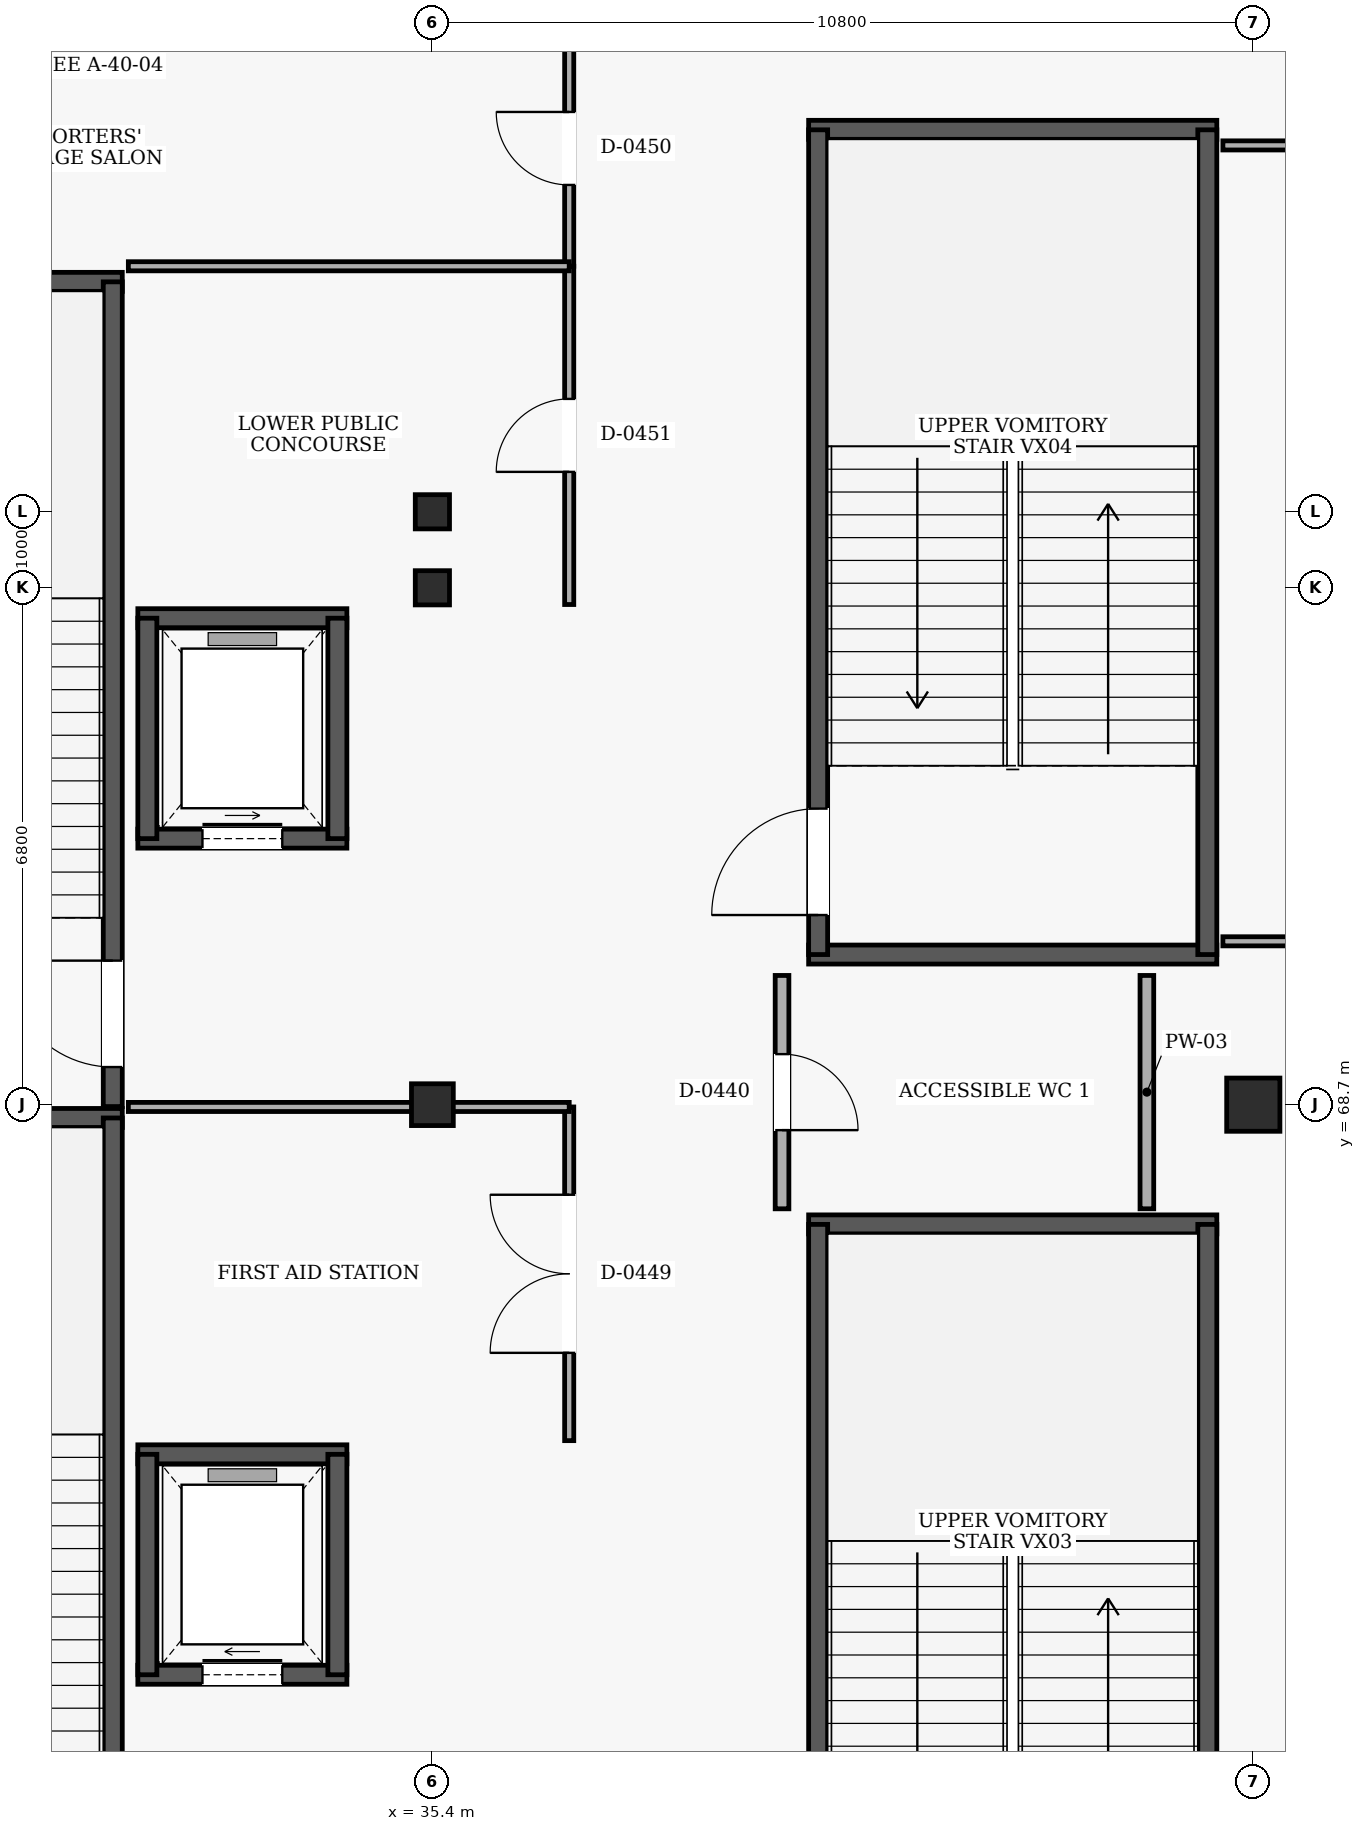
"""IFC4 building model, lengths in metres.
Left out: names, types, materials, properties, quantities, classifications, styles, units other than length and angle.
Written with IfcOpenShell. Run it as: python <this file> out.ifc"""

import sys

from ifc_helpers import new_model, si_unit, direction, frame, frame_2d, origin, origin_2d, place, context, subcontext, project, spatial, rectangle, extrude, element, fill, save


model = new_model("IFC4")
c1 = context("Model", 3, precision=1e-05, world=origin(), true_north=direction((0.0, 1.0)))
c2 = subcontext(c1, "Body", "Model", "MODEL_VIEW")
j1 = project(units=[si_unit("LENGTHUNIT", "METRE"), si_unit("PLANEANGLEUNIT", "RADIAN")], contexts=[c1])
p1 = place(None, origin())
s1 = spatial("IfcSite", under=j1, at=p1, CompositionType="ELEMENT")
p2 = place(p1, origin())
s2 = spatial("IfcBuilding", under=s1, at=p2, CompositionType="ELEMENT")
p3 = place(p2, frame((0.0, 0.0, 5.4)))
s3 = spatial("IfcBuildingStorey", under=s2, at=p3, CompositionType="ELEMENT", Elevation=5.4)
p4 = place(p3, frame((35.4, 68.7, 0.0), z_axis=(0.0, 0.0, 1.0), x_axis=(1.0, 0.0, 0.0)))
e1 = element("IfcColumn", 1, at=p4, inside=s3, PredefinedType="COLUMN", context=c2, shape_type="SweptSolid", body=[
    extrude(rectangle(XDim=0.55, YDim=0.55, at=origin_2d()), origin(), (0.0, 0.0, 1.0), 4.8),
])
for number, where, z_axis, x_axis in (
    (2, (35.4, 75.5, 0.0), (0.0, 0.0, 1.0), (1.0, 0.0, 0.0)),
    (3, (35.4, 76.5, 0.0), (0.0, 0.0, 1.0), (1.0, 0.0, 0.0)),
):
    element("IfcColumn", number, at=place(p3, frame(where, z_axis=z_axis, x_axis=x_axis)), inside=s3, PredefinedType="COLUMN", context=c2, shape_type="SweptSolid", body=[
        extrude(rectangle(XDim=0.45, YDim=0.45, at=origin_2d()), origin(), (0.0, 0.0, 1.0), 4.8),
    ])
p5 = place(p3, frame((46.2, 68.7, 0.0), z_axis=(0.0, 0.0, 1.0), x_axis=(1.0, 0.0, 0.0)))
e4 = element("IfcColumn", 4, at=p5, inside=s3, PredefinedType="COLUMN", context=c2, shape_type="SweptSolid", body=[
    extrude(rectangle(XDim=0.7, YDim=0.7, at=origin_2d()), origin(), (0.0, 0.0, 1.0), 4.8),
])
p6 = place(p3, frame((31.32, 68.525, 0.0), z_axis=(0.0, 0.0, 1.0), x_axis=(-1.0, 0.0, 0.0)))
e5 = element("IfcWall", 5, at=p6, inside=s3, PredefinedType="SHEAR", context=c2, shape_type="SweptSolid", body=[
    extrude(rectangle(XDim=5.37, YDim=0.25, at=frame_2d((2.685, 0.0))), origin(), (0.0, 0.0, 1.0), 4.5),
])
p7 = place(p3, frame((31.195, 57.675, 0.0), z_axis=(0.0, 0.0, 1.0), x_axis=(0.0, 1.0, 0.0)))
e6 = element("IfcWall", 6, at=p7, inside=s3, PredefinedType="SHEAR", context=c2, shape_type="SweptSolid", body=[
    extrude(rectangle(XDim=10.85, YDim=0.25, at=frame_2d((5.425, 0.0))), origin(), (0.0, 0.0, 1.0), 4.5),
])
p8 = place(p7, frame((0.52, 0.0, 0.0)))
e7 = element("IfcOpeningElement", 7, at=p8, cuts=e6, PredefinedType="OPENING", context=c2, shape_type="SweptSolid", body=[
    extrude(rectangle(XDim=1.4, YDim=2.15, at=frame_2d((0.7, 1.075))), frame((0.0, 0.135, 0.0), z_axis=(0.0, -1.0, 0.0), x_axis=(1.0, 0.0, 0.0)), (0.0, 0.0, 1.0), 0.27),
])
p9 = place(p3, frame((31.32, 79.525, 0.0), z_axis=(0.0, 0.0, 1.0), x_axis=(-1.0, 0.0, 0.0)))
e8 = element("IfcWall", 8, at=p9, inside=s3, PredefinedType="SHEAR", context=c2, shape_type="SweptSolid", body=[
    extrude(rectangle(XDim=5.37, YDim=0.25, at=frame_2d((2.685, 0.0))), origin(), (0.0, 0.0, 1.0), 4.5),
])
p10 = place(p3, frame((31.195, 68.675, 0.0), z_axis=(0.0, 0.0, 1.0), x_axis=(0.0, 1.0, 0.0)))
e9 = element("IfcWall", 9, at=p10, inside=s3, PredefinedType="SHEAR", context=c2, shape_type="SweptSolid", body=[
    extrude(rectangle(XDim=10.85, YDim=0.25, at=frame_2d((5.425, 0.0))), origin(), (0.0, 0.0, 1.0), 4.5),
])
p11 = place(p10, frame((0.52, 0.0, 0.0)))
e10 = element("IfcOpeningElement", 10, at=p11, cuts=e9, PredefinedType="OPENING", context=c2, shape_type="SweptSolid", body=[
    extrude(rectangle(XDim=1.4, YDim=2.15, at=frame_2d((0.7, 1.075))), frame((0.0, 0.135, 0.0), z_axis=(0.0, -1.0, 0.0), x_axis=(1.0, 0.0, 0.0)), (0.0, 0.0, 1.0), 0.27),
])
p12 = place(p3, frame((45.72, 67.125, 0.0), z_axis=(0.0, 0.0, 1.0), x_axis=(-1.0, 0.0, 0.0)))
e11 = element("IfcWall", 11, at=p12, inside=s3, PredefinedType="SHEAR", context=c2, shape_type="SweptSolid", body=[
    extrude(rectangle(XDim=5.37, YDim=0.25, at=frame_2d((2.685, 0.0))), origin(), (0.0, 0.0, 1.0), 4.5),
])
p13 = place(p3, frame((40.475, 56.275, 0.0), z_axis=(0.0, 0.0, 1.0), x_axis=(0.0, 1.0, 0.0)))
e12 = element("IfcWall", 12, at=p13, inside=s3, PredefinedType="SHEAR", context=c2, shape_type="SweptSolid", body=[
    extrude(rectangle(XDim=10.85, YDim=0.25, at=frame_2d((5.425, 0.0))), origin(), (0.0, 0.0, 1.0), 4.5),
])
p14 = place(p13, frame((0.52, 0.0, 0.0)))
e13 = element("IfcOpeningElement", 13, at=p14, cuts=e12, PredefinedType="OPENING", context=c2, shape_type="SweptSolid", body=[
    extrude(rectangle(XDim=1.4, YDim=2.15, at=frame_2d((0.7, 1.075))), frame((0.0, 0.135, 0.0), z_axis=(0.0, -1.0, 0.0), x_axis=(1.0, 0.0, 0.0)), (0.0, 0.0, 1.0), 0.27),
])
p15 = place(p3, frame((45.595, 56.275, 0.0), z_axis=(0.0, 0.0, 1.0), x_axis=(0.0, 1.0, 0.0)))
e14 = element("IfcWall", 14, at=p15, inside=s3, PredefinedType="SHEAR", context=c2, shape_type="SweptSolid", body=[
    extrude(rectangle(XDim=10.85, YDim=0.25, at=frame_2d((5.425, 0.0))), origin(), (0.0, 0.0, 1.0), 4.5),
])
for number, where, z_axis, x_axis in (
    (15, (40.35, 70.675, 0.0), (0.0, 0.0, 1.0), (1.0, 0.0, 0.0)),
    (16, (45.72, 81.525, 0.0), (0.0, 0.0, 1.0), (-1.0, 0.0, 0.0)),
):
    element("IfcWall", number, at=place(p3, frame(where, z_axis=z_axis, x_axis=x_axis)), inside=s3, PredefinedType="SHEAR", context=c2, shape_type="SweptSolid", body=[
        extrude(rectangle(XDim=5.37, YDim=0.25, at=frame_2d((2.685, 0.0))), origin(), (0.0, 0.0, 1.0), 4.5),
    ])
p16 = place(p3, frame((40.475, 70.675, 0.0), z_axis=(0.0, 0.0, 1.0), x_axis=(0.0, 1.0, 0.0)))
e17 = element("IfcWall", 17, at=p16, inside=s3, PredefinedType="SHEAR", context=c2, shape_type="SweptSolid", body=[
    extrude(rectangle(XDim=10.85, YDim=0.25, at=frame_2d((5.425, 0.0))), origin(), (0.0, 0.0, 1.0), 4.5),
])
p17 = place(p16, frame((0.52, 0.0, 0.0)))
e18 = element("IfcOpeningElement", 18, at=p17, cuts=e17, PredefinedType="OPENING", context=c2, shape_type="SweptSolid", body=[
    extrude(rectangle(XDim=1.4, YDim=2.15, at=frame_2d((0.7, 1.075))), frame((0.0, 0.135, 0.0), z_axis=(0.0, -1.0, 0.0), x_axis=(1.0, 0.0, 0.0)), (0.0, 0.0, 1.0), 0.27),
])
p18 = place(p3, frame((45.595, 70.675, 0.0), z_axis=(0.0, 0.0, 1.0), x_axis=(0.0, 1.0, 0.0)))
e19 = element("IfcWall", 19, at=p18, inside=s3, PredefinedType="SHEAR", context=c2, shape_type="SweptSolid", body=[
    extrude(rectangle(XDim=10.85, YDim=0.25, at=frame_2d((5.425, 0.0))), origin(), (0.0, 0.0, 1.0), 4.5),
])
p19 = place(p3, frame((31.525, 61.2, 0.0), z_axis=(0.0, 0.0, 1.0), x_axis=(1.0, 0.0, 0.0)))
e20 = element("IfcWall", 20, at=p19, inside=s3, PredefinedType="SHEAR", context=c2, shape_type="SweptSolid", body=[
    extrude(rectangle(XDim=2.75, YDim=0.25, at=frame_2d((1.375, 0.0))), origin(), (0.0, 0.0, 1.0), 4.5),
])
p20 = place(p19, frame((0.85, 0.0, 0.0)))
e21 = element("IfcOpeningElement", 21, at=p20, cuts=e20, PredefinedType="OPENING", context=c2, shape_type="SweptSolid", body=[
    extrude(rectangle(XDim=1.05, YDim=2.15, at=frame_2d((0.525, 1.075))), frame((0.0, 0.135, 0.0), z_axis=(0.0, -1.0, 0.0), x_axis=(1.0, 0.0, 0.0)), (0.0, 0.0, 1.0), 0.27),
])
p21 = place(p3, frame((34.275, 64.1, 0.0), z_axis=(0.0, 0.0, 1.0), x_axis=(-1.0, 0.0, 0.0)))
e22 = element("IfcWall", 22, at=p21, inside=s3, PredefinedType="SHEAR", context=c2, shape_type="SweptSolid", body=[
    extrude(rectangle(XDim=2.75, YDim=0.25, at=frame_2d((1.375, 0.0))), origin(), (0.0, 0.0, 1.0), 4.5),
])
for number, where, z_axis, x_axis in (
    (23, (31.65, 64.1, 0.0), (0.0, 0.0, 1.0), (0.0, -1.0, 0.0)),
    (24, (34.15, 61.2, 0.0), (0.0, 0.0, 1.0), (0.0, 1.0, 0.0)),
):
    element("IfcWall", number, at=place(p3, frame(where, z_axis=z_axis, x_axis=x_axis)), inside=s3, PredefinedType="SHEAR", context=c2, shape_type="SweptSolid", body=[
        extrude(rectangle(XDim=2.9, YDim=0.25, at=frame_2d((1.45, 0.0))), origin(), (0.0, 0.0, 1.0), 4.5),
    ])
p22 = place(p3, frame((31.525, 72.2, 0.0), z_axis=(0.0, 0.0, 1.0), x_axis=(1.0, 0.0, 0.0)))
e25 = element("IfcWall", 25, at=p22, inside=s3, PredefinedType="SHEAR", context=c2, shape_type="SweptSolid", body=[
    extrude(rectangle(XDim=2.75, YDim=0.25, at=frame_2d((1.375, 0.0))), origin(), (0.0, 0.0, 1.0), 4.5),
])
p23 = place(p22, frame((0.85, 0.0, 0.0)))
e26 = element("IfcOpeningElement", 26, at=p23, cuts=e25, PredefinedType="OPENING", context=c2, shape_type="SweptSolid", body=[
    extrude(rectangle(XDim=1.05, YDim=2.15, at=frame_2d((0.525, 1.075))), frame((0.0, 0.135, 0.0), z_axis=(0.0, -1.0, 0.0), x_axis=(1.0, 0.0, 0.0)), (0.0, 0.0, 1.0), 0.27),
])
p24 = place(p3, frame((34.275, 75.1, 0.0), z_axis=(0.0, 0.0, 1.0), x_axis=(-1.0, 0.0, 0.0)))
e27 = element("IfcWall", 27, at=p24, inside=s3, PredefinedType="SHEAR", context=c2, shape_type="SweptSolid", body=[
    extrude(rectangle(XDim=2.75, YDim=0.25, at=frame_2d((1.375, 0.0))), origin(), (0.0, 0.0, 1.0), 4.5),
])
for number, where, z_axis, x_axis in (
    (28, (31.65, 75.1, 0.0), (0.0, 0.0, 1.0), (0.0, -1.0, 0.0)),
    (29, (34.15, 72.2, 0.0), (0.0, 0.0, 1.0), (0.0, 1.0, 0.0)),
):
    element("IfcWall", number, at=place(p3, frame(where, z_axis=z_axis, x_axis=x_axis)), inside=s3, PredefinedType="SHEAR", context=c2, shape_type="SweptSolid", body=[
        extrude(rectangle(XDim=2.9, YDim=0.25, at=frame_2d((1.45, 0.0))), origin(), (0.0, 0.0, 1.0), 4.5),
    ])
p25 = place(p3, frame((44.8, 67.33, 0.0), z_axis=(0.0, 0.0, 1.0), x_axis=(0.0, 1.0, 0.0)))
e30 = element("IfcWall", 30, at=p25, inside=s3, PredefinedType="PARTITIONING", context=c2, shape_type="SweptSolid", body=[
    extrude(rectangle(XDim=3.07, YDim=0.18, at=frame_2d((1.535, 0.0))), origin(), (0.0, 0.0, 1.0), 4.5),
])
p26 = place(p3, frame((40.0, 70.4, 0.0), z_axis=(0.0, 0.0, 1.0), x_axis=(0.0, -1.0, 0.0)))
e31 = element("IfcWall", 31, at=p26, inside=s3, PredefinedType="PARTITIONING", context=c2, shape_type="SweptSolid", body=[
    extrude(rectangle(XDim=3.07, YDim=0.18, at=frame_2d((1.535, 0.0))), origin(), (0.0, 0.0, 1.0), 4.5),
])
p27 = place(p26, frame((1.035, 0.0, 0.0)))
e32 = element("IfcOpeningElement", 32, at=p27, cuts=e31, PredefinedType="OPENING", context=c2, shape_type="SweptSolid", body=[
    extrude(rectangle(XDim=1.0, YDim=2.1, at=frame_2d((0.5, 1.05))), frame((0.0, 0.1, 0.0), z_axis=(0.0, -1.0, 0.0), x_axis=(1.0, 0.0, 0.0)), (0.0, 0.0, 1.0), 0.2),
])
p28 = place(p3, frame((37.2, 64.28, 0.0), z_axis=(0.0, 0.0, 1.0), x_axis=(0.0, 1.0, 0.0)))
e33 = element("IfcWall", 33, at=p28, inside=s3, PredefinedType="PARTITIONING", context=c2, shape_type="SweptSolid", body=[
    extrude(rectangle(XDim=4.39, YDim=0.12, at=frame_2d((2.195, 0.0))), origin(), (0.0, 0.0, 1.0), 4.5),
])
p29 = place(p28, frame((1.155, 0.0, 0.0)))
e34 = element("IfcOpeningElement", 34, at=p29, cuts=e33, PredefinedType="OPENING", context=c2, shape_type="SweptSolid", body=[
    extrude(rectangle(XDim=2.08, YDim=2.35, at=frame_2d((1.04, 1.175))), frame((0.0, 0.07, 0.0), z_axis=(0.0, -1.0, 0.0), x_axis=(1.0, 0.0, 0.0)), (0.0, 0.0, 1.0), 0.14),
])
p30 = place(p3, frame((37.2, 68.67, 0.0), z_axis=(0.0, 0.0, 1.0), x_axis=(-1.0, 0.0, 0.0)))
e35 = element("IfcWall", 35, at=p30, inside=s3, PredefinedType="PARTITIONING", context=c2, shape_type="SweptSolid", body=[
    extrude(rectangle(XDim=5.8, YDim=0.12, at=frame_2d((2.9, 0.0))), origin(), (0.0, 0.0, 1.0), 3.58),
])
p31 = place(p3, frame((37.2, 79.73, 0.0), z_axis=(0.0, 0.0, 1.0), x_axis=(0.0, 1.0, 0.0)))
e36 = element("IfcWall", 36, at=p31, inside=s3, PredefinedType="PARTITIONING", context=c2, shape_type="SweptSolid", body=[
    extrude(rectangle(XDim=3.1, YDim=0.12, at=frame_2d((1.55, 0.0))), origin(), (0.0, 0.0, 1.0), 4.5),
])
p32 = place(p31, frame((1.07, 0.0, 0.0)))
e37 = element("IfcOpeningElement", 37, at=p32, cuts=e36, PredefinedType="OPENING", context=c2, shape_type="SweptSolid", body=[
    extrude(rectangle(XDim=0.96, YDim=2.1, at=frame_2d((0.48, 1.05))), frame((0.0, 0.07, 0.0), z_axis=(0.0, -1.0, 0.0), x_axis=(1.0, 0.0, 0.0)), (0.0, 0.0, 1.0), 0.14),
])
p33 = place(p3, frame((37.2, 75.28, 0.0), z_axis=(0.0, 0.0, 1.0), x_axis=(0.0, 1.0, 0.0)))
e38 = element("IfcWall", 38, at=p33, inside=s3, PredefinedType="PARTITIONING", context=c2, shape_type="SweptSolid", body=[
    extrude(rectangle(XDim=4.45, YDim=0.12, at=frame_2d((2.225, 0.0))), origin(), (0.0, 0.0, 1.0), 4.5),
])
p34 = place(p33, frame((1.745, 0.0, 0.0)))
e39 = element("IfcOpeningElement", 39, at=p34, cuts=e38, PredefinedType="OPENING", context=c2, shape_type="SweptSolid", body=[
    extrude(rectangle(XDim=0.96, YDim=2.1, at=frame_2d((0.48, 1.05))), frame((0.0, 0.07, 0.0), z_axis=(0.0, -1.0, 0.0), x_axis=(1.0, 0.0, 0.0)), (0.0, 0.0, 1.0), 0.14),
])
p35 = place(p3, frame((37.2, 79.73, 0.0), z_axis=(0.0, 0.0, 1.0), x_axis=(-1.0, 0.0, 0.0)))
e40 = element("IfcWall", 40, at=p35, inside=s3, PredefinedType="PARTITIONING", context=c2, shape_type="SweptSolid", body=[
    extrude(rectangle(XDim=5.8, YDim=0.12, at=frame_2d((2.9, 0.0))), origin(), (0.0, 0.0, 1.0), 4.5),
])
p36 = place(p3, frame((45.8, 70.849, 0.0), z_axis=(0.0, 0.0, 1.0), x_axis=(1.0, 0.0, 0.0)))
e41 = element("IfcWall", 41, at=p36, inside=s3, PredefinedType="PARTITIONING", context=c2, shape_type="SweptSolid", body=[
    extrude(rectangle(XDim=22.6, YDim=0.12, at=frame_2d((11.3, 0.0))), origin(), (0.0, 0.0, 1.0), 4.5),
])
p37 = place(p3, frame((68.4, 81.32, 0.0), z_axis=(0.0, 0.0, 1.0), x_axis=(-1.0, 0.0, 0.0)))
e42 = element("IfcWall", 42, at=p37, inside=s3, PredefinedType="PARTITIONING", context=c2, shape_type="SweptSolid", body=[
    extrude(rectangle(XDim=22.6, YDim=0.12, at=frame_2d((11.3, 0.0))), origin(), (0.0, 0.0, 1.0), 4.5),
])
p38 = place(p37, frame((10.84, 0.0, 0.0)))
e43 = element("IfcOpeningElement", 43, at=p38, cuts=e42, PredefinedType="OPENING", context=c2, shape_type="SweptSolid", body=[
    extrude(rectangle(XDim=0.92, YDim=2.1, at=frame_2d((0.46, 1.05))), frame((0.0, 0.07, 0.0), z_axis=(0.0, -1.0, 0.0), x_axis=(1.0, 0.0, 0.0)), (0.0, 0.0, 1.0), 0.14),
])
p39 = place(p11, origin())
e44 = element("IfcDoor", 44, at=p39, inside=s3, OperationType="SINGLE_SWING_RIGHT", PredefinedType="DOOR", context=c2, shape_type="SweptSolid", body=[
    extrude(rectangle(XDim=1.4, YDim=2.15, at=frame_2d((0.7, 1.075))), frame((0.0, 0.025, 0.0), z_axis=(0.0, -1.0, 0.0), x_axis=(1.0, 0.0, 0.0)), (0.0, 0.0, 1.0), 0.05),
])
fill(e10, e44)
p40 = place(p17, frame((1.4, 0.0, 0.0), z_axis=(0.0, 0.0, 1.0), x_axis=(-1.0, 0.0, 0.0)))
e45 = element("IfcDoor", 45, at=p40, inside=s3, OperationType="SINGLE_SWING_RIGHT", PredefinedType="DOOR", context=c2, shape_type="SweptSolid", body=[
    extrude(rectangle(XDim=1.4, YDim=2.15, at=frame_2d((0.7, 1.075))), frame((0.0, 0.025, 0.0), z_axis=(0.0, -1.0, 0.0), x_axis=(1.0, 0.0, 0.0)), (0.0, 0.0, 1.0), 0.05),
])
fill(e18, e45)
p41 = place(p20, origin())
e46 = element("IfcDoor", 46, at=p41, inside=s3, OperationType="SLIDING_TO_RIGHT", PredefinedType="DOOR", context=c2, shape_type="SweptSolid", body=[
    extrude(rectangle(XDim=1.05, YDim=2.15, at=frame_2d((0.525, 1.075))), frame((0.0, 0.025, 0.0), z_axis=(0.0, -1.0, 0.0), x_axis=(1.0, 0.0, 0.0)), (0.0, 0.0, 1.0), 0.05),
])
fill(e21, e46)
p42 = place(p23, origin())
e47 = element("IfcDoor", 47, at=p42, inside=s3, OperationType="SLIDING_TO_LEFT", PredefinedType="DOOR", context=c2, shape_type="SweptSolid", body=[
    extrude(rectangle(XDim=1.05, YDim=2.15, at=frame_2d((0.525, 1.075))), frame((0.0, 0.025, 0.0), z_axis=(0.0, -1.0, 0.0), x_axis=(1.0, 0.0, 0.0)), (0.0, 0.0, 1.0), 0.05),
])
fill(e26, e47)
p43 = place(p27, origin())
e48 = element("IfcDoor", 48, at=p43, inside=s3, OperationType="SINGLE_SWING_RIGHT", PredefinedType="DOOR", context=c2, shape_type="SweptSolid", body=[
    extrude(rectangle(XDim=1.0, YDim=2.1, at=frame_2d((0.5, 1.05))), frame((0.0, 0.025, 0.0), z_axis=(0.0, -1.0, 0.0), x_axis=(1.0, 0.0, 0.0)), (0.0, 0.0, 1.0), 0.05),
])
fill(e32, e48)
p44 = place(p29, origin())
e49 = element("IfcDoor", 49, at=p44, inside=s3, OperationType="DOUBLE_DOOR_SINGLE_SWING", PredefinedType="DOOR", context=c2, shape_type="SweptSolid", body=[
    extrude(rectangle(XDim=2.08, YDim=2.35, at=frame_2d((1.04, 1.175))), frame((0.0, 0.025, 0.0), z_axis=(0.0, -1.0, 0.0), x_axis=(1.0, 0.0, 0.0)), (0.0, 0.0, 1.0), 0.05),
])
fill(e34, e49)
p45 = place(p32, origin())
e50 = element("IfcDoor", 50, at=p45, inside=s3, OperationType="SINGLE_SWING_RIGHT", PredefinedType="DOOR", context=c2, shape_type="SweptSolid", body=[
    extrude(rectangle(XDim=0.96, YDim=2.1, at=frame_2d((0.48, 1.05))), frame((0.0, 0.025, 0.0), z_axis=(0.0, -1.0, 0.0), x_axis=(1.0, 0.0, 0.0)), (0.0, 0.0, 1.0), 0.05),
])
fill(e37, e50)
p46 = place(p34, origin())
e51 = element("IfcDoor", 51, at=p46, inside=s3, OperationType="SINGLE_SWING_LEFT", PredefinedType="DOOR", context=c2, shape_type="SweptSolid", body=[
    extrude(rectangle(XDim=0.96, YDim=2.1, at=frame_2d((0.48, 1.05))), frame((0.0, 0.025, 0.0), z_axis=(0.0, -1.0, 0.0), x_axis=(1.0, 0.0, 0.0)), (0.0, 0.0, 1.0), 0.05),
])
fill(e39, e51)
save(model, sys.argv[1])
